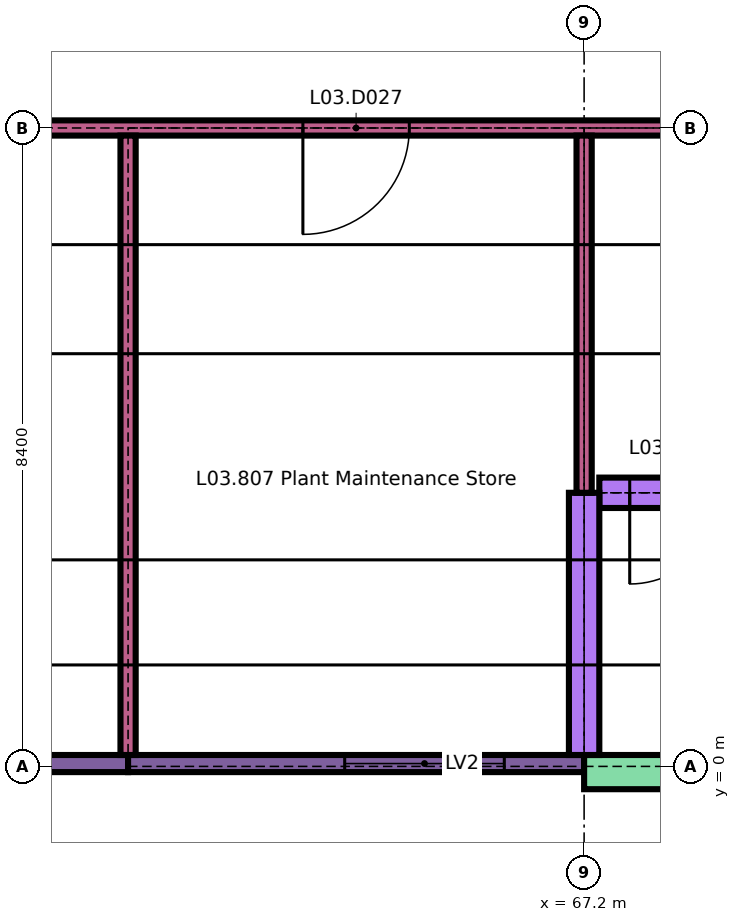
"""IFC4 building model, lengths in metres.
Left out: names, types, materials, properties, quantities, classifications, styles, units other than length and angle.
Written with IfcOpenShell. Run it as: python <this file> out.ifc"""

import sys

from ifc_helpers import new_model, si_unit, direction, frame, frame_2d, origin, place, context, subcontext, project, spatial, rectangle, extrude, element, fill, save


model = new_model("IFC4")
c1 = context("Model", 3, precision=1e-05, world=origin(), true_north=direction((0.0, 1.0)))
c2 = subcontext(c1, "Body", "Model", "MODEL_VIEW")
j1 = project(units=[si_unit("LENGTHUNIT", "METRE"), si_unit("PLANEANGLEUNIT", "RADIAN")], contexts=[c1])
p1 = place(None, origin())
s1 = spatial("IfcSite", under=j1, at=p1, CompositionType="ELEMENT")
p2 = place(p1, origin())
s2 = spatial("IfcBuilding", under=s1, at=p2, CompositionType="ELEMENT")
p3 = place(p2, frame((0.0, 0.0, 15.3)))
s3 = spatial("IfcBuildingStorey", under=s2, at=p3, CompositionType="ELEMENT", Elevation=15.3)
p4 = place(p3, frame((59.175, 0.038, 0.0), z_axis=(0.0, 0.0, 1.0), x_axis=(1.0, 0.0, 0.0)))
e1 = element("IfcWall", 1, at=p4, inside=s3, PredefinedType="SOLIDWALL", context=c2, shape_type="SweptSolid", body=[
    extrude(rectangle(XDim=2.025, YDim=0.225, at=frame_2d((1.012, 0.0))), origin(), (0.0, 0.0, 1.0), 4.0),
])
p5 = place(p3, frame((61.2, 0.038, 0.0), z_axis=(0.0, 0.0, 1.0), x_axis=(1.0, 0.0, 0.0)))
e2 = element("IfcWall", 2, at=p5, inside=s3, PredefinedType="SOLIDWALL", context=c2, shape_type="SweptSolid", body=[
    extrude(rectangle(XDim=6.0, YDim=0.225, at=frame_2d((3.0, 0.0))), origin(), (0.0, 0.0, 1.0), 4.0),
])
p6 = place(p5, frame((2.85, 0.0, 0.6)))
e3 = element("IfcOpeningElement", 3, at=p6, cuts=e2, PredefinedType="OPENING", context=c2, shape_type="SweptSolid", body=[
    extrude(rectangle(XDim=2.1, YDim=2.1, at=frame_2d((1.05, 1.05))), frame((0.0, 0.123, 0.0), z_axis=(0.0, -1.0, 0.0), x_axis=(1.0, 0.0, 0.0)), (0.0, 0.0, 1.0), 0.245),
])
p7 = place(p3, frame((67.2, -0.075, 0.0), z_axis=(0.0, 0.0, 1.0), x_axis=(1.0, 0.0, 0.0)))
e4 = element("IfcWall", 4, at=p7, inside=s3, PredefinedType="SOLIDWALL", context=c2, shape_type="SweptSolid", body=[
    extrude(rectangle(XDim=3.15, YDim=0.45, at=frame_2d((1.575, 0.0))), origin(), (0.0, 0.0, 1.0), 4.0),
])
p8 = place(p3, frame((42.21, 4.2, 4.904), z_axis=(0.0, 0.0, 1.0), x_axis=(1.0, 0.0, 0.0)))
e5 = element("IfcWall", 5, at=p8, inside=s3, PredefinedType="SOLIDWALL", context=c2, shape_type="SweptSolid", body=[
    extrude(rectangle(XDim=58.38, YDim=0.2, at=frame_2d((29.19, 0.0))), origin(), (0.0, 0.0, 1.0), 2.539),
])
p9 = place(p8, frame((1.05, 0.0, 0.3)))
e6 = element("IfcOpeningElement", 6, at=p9, cuts=e5, PredefinedType="OPENING", context=c2, shape_type="SweptSolid", body=[
    extrude(rectangle(XDim=2.1, YDim=1.8, at=frame_2d((1.05, 0.9))), frame((0.0, 0.11, 0.0), z_axis=(0.0, -1.0, 0.0), x_axis=(1.0, 0.0, 0.0)), (0.0, 0.0, 1.0), 0.22),
])
p10 = place(p8, frame((5.25, 0.0, 0.3)))
e7 = element("IfcOpeningElement", 7, at=p10, cuts=e5, PredefinedType="OPENING", context=c2, shape_type="SweptSolid", body=[
    extrude(rectangle(XDim=2.1, YDim=1.8, at=frame_2d((1.05, 0.9))), frame((0.0, 0.11, 0.0), z_axis=(0.0, -1.0, 0.0), x_axis=(1.0, 0.0, 0.0)), (0.0, 0.0, 1.0), 0.22),
])
p11 = place(p8, frame((9.45, 0.0, 0.3)))
e8 = element("IfcOpeningElement", 8, at=p11, cuts=e5, PredefinedType="OPENING", context=c2, shape_type="SweptSolid", body=[
    extrude(rectangle(XDim=2.1, YDim=1.8, at=frame_2d((1.05, 0.9))), frame((0.0, 0.11, 0.0), z_axis=(0.0, -1.0, 0.0), x_axis=(1.0, 0.0, 0.0)), (0.0, 0.0, 1.0), 0.22),
])
p12 = place(p8, frame((13.65, 0.0, 0.3)))
e9 = element("IfcOpeningElement", 9, at=p12, cuts=e5, PredefinedType="OPENING", context=c2, shape_type="SweptSolid", body=[
    extrude(rectangle(XDim=2.1, YDim=1.8, at=frame_2d((1.05, 0.9))), frame((0.0, 0.11, 0.0), z_axis=(0.0, -1.0, 0.0), x_axis=(1.0, 0.0, 0.0)), (0.0, 0.0, 1.0), 0.22),
])
p13 = place(p8, frame((17.85, 0.0, 0.3)))
e10 = element("IfcOpeningElement", 10, at=p13, cuts=e5, PredefinedType="OPENING", context=c2, shape_type="SweptSolid", body=[
    extrude(rectangle(XDim=2.1, YDim=1.8, at=frame_2d((1.05, 0.9))), frame((0.0, 0.11, 0.0), z_axis=(0.0, -1.0, 0.0), x_axis=(1.0, 0.0, 0.0)), (0.0, 0.0, 1.0), 0.22),
])
p14 = place(p8, frame((22.05, 0.0, 0.3)))
e11 = element("IfcOpeningElement", 11, at=p14, cuts=e5, PredefinedType="OPENING", context=c2, shape_type="SweptSolid", body=[
    extrude(rectangle(XDim=2.1, YDim=1.8, at=frame_2d((1.05, 0.9))), frame((0.0, 0.11, 0.0), z_axis=(0.0, -1.0, 0.0), x_axis=(1.0, 0.0, 0.0)), (0.0, 0.0, 1.0), 0.22),
])
p15 = place(p8, frame((26.25, 0.0, 0.3)))
e12 = element("IfcOpeningElement", 12, at=p15, cuts=e5, PredefinedType="OPENING", context=c2, shape_type="SweptSolid", body=[
    extrude(rectangle(XDim=2.1, YDim=1.8, at=frame_2d((1.05, 0.9))), frame((0.0, 0.11, 0.0), z_axis=(0.0, -1.0, 0.0), x_axis=(1.0, 0.0, 0.0)), (0.0, 0.0, 1.0), 0.22),
])
p16 = place(p8, frame((30.45, 0.0, 0.3)))
e13 = element("IfcOpeningElement", 13, at=p16, cuts=e5, PredefinedType="OPENING", context=c2, shape_type="SweptSolid", body=[
    extrude(rectangle(XDim=2.1, YDim=1.8, at=frame_2d((1.05, 0.9))), frame((0.0, 0.11, 0.0), z_axis=(0.0, -1.0, 0.0), x_axis=(1.0, 0.0, 0.0)), (0.0, 0.0, 1.0), 0.22),
])
p17 = place(p8, frame((34.65, 0.0, 0.3)))
e14 = element("IfcOpeningElement", 14, at=p17, cuts=e5, PredefinedType="OPENING", context=c2, shape_type="SweptSolid", body=[
    extrude(rectangle(XDim=2.1, YDim=1.8, at=frame_2d((1.05, 0.9))), frame((0.0, 0.11, 0.0), z_axis=(0.0, -1.0, 0.0), x_axis=(1.0, 0.0, 0.0)), (0.0, 0.0, 1.0), 0.22),
])
p18 = place(p8, frame((38.85, 0.0, 0.3)))
e15 = element("IfcOpeningElement", 15, at=p18, cuts=e5, PredefinedType="OPENING", context=c2, shape_type="SweptSolid", body=[
    extrude(rectangle(XDim=2.1, YDim=1.8, at=frame_2d((1.05, 0.9))), frame((0.0, 0.11, 0.0), z_axis=(0.0, -1.0, 0.0), x_axis=(1.0, 0.0, 0.0)), (0.0, 0.0, 1.0), 0.22),
])
p19 = place(p8, frame((43.05, 0.0, 0.3)))
e16 = element("IfcOpeningElement", 16, at=p19, cuts=e5, PredefinedType="OPENING", context=c2, shape_type="SweptSolid", body=[
    extrude(rectangle(XDim=2.1, YDim=1.8, at=frame_2d((1.05, 0.9))), frame((0.0, 0.11, 0.0), z_axis=(0.0, -1.0, 0.0), x_axis=(1.0, 0.0, 0.0)), (0.0, 0.0, 1.0), 0.22),
])
p20 = place(p8, frame((47.25, 0.0, 0.3)))
e17 = element("IfcOpeningElement", 17, at=p20, cuts=e5, PredefinedType="OPENING", context=c2, shape_type="SweptSolid", body=[
    extrude(rectangle(XDim=2.1, YDim=1.8, at=frame_2d((1.05, 0.9))), frame((0.0, 0.11, 0.0), z_axis=(0.0, -1.0, 0.0), x_axis=(1.0, 0.0, 0.0)), (0.0, 0.0, 1.0), 0.22),
])
p21 = place(p8, frame((51.45, 0.0, 0.3)))
e18 = element("IfcOpeningElement", 18, at=p21, cuts=e5, PredefinedType="OPENING", context=c2, shape_type="SweptSolid", body=[
    extrude(rectangle(XDim=2.1, YDim=1.8, at=frame_2d((1.05, 0.9))), frame((0.0, 0.11, 0.0), z_axis=(0.0, -1.0, 0.0), x_axis=(1.0, 0.0, 0.0)), (0.0, 0.0, 1.0), 0.22),
])
p22 = place(p8, frame((55.65, 0.0, 0.3)))
e19 = element("IfcOpeningElement", 19, at=p22, cuts=e5, PredefinedType="OPENING", context=c2, shape_type="SweptSolid", body=[
    extrude(rectangle(XDim=2.1, YDim=1.8, at=frame_2d((1.05, 0.9))), frame((0.0, 0.11, 0.0), z_axis=(0.0, -1.0, 0.0), x_axis=(1.0, 0.0, 0.0)), (0.0, 0.0, 1.0), 0.22),
])
p23 = place(p3, frame((42.21, 8.4, 4.904), z_axis=(0.0, 0.0, 1.0), x_axis=(1.0, 0.0, 0.0)))
e20 = element("IfcWall", 20, at=p23, inside=s3, PredefinedType="SOLIDWALL", context=c2, shape_type="SweptSolid", body=[
    extrude(rectangle(XDim=58.38, YDim=0.2, at=frame_2d((29.19, 0.0))), origin(), (0.0, 0.0, 1.0), 2.539),
])
p24 = place(p23, frame((1.05, 0.0, 0.3)))
e21 = element("IfcOpeningElement", 21, at=p24, cuts=e20, PredefinedType="OPENING", context=c2, shape_type="SweptSolid", body=[
    extrude(rectangle(XDim=2.1, YDim=1.8, at=frame_2d((1.05, 0.9))), frame((0.0, 0.11, 0.0), z_axis=(0.0, -1.0, 0.0), x_axis=(1.0, 0.0, 0.0)), (0.0, 0.0, 1.0), 0.22),
])
p25 = place(p23, frame((5.25, 0.0, 0.3)))
e22 = element("IfcOpeningElement", 22, at=p25, cuts=e20, PredefinedType="OPENING", context=c2, shape_type="SweptSolid", body=[
    extrude(rectangle(XDim=2.1, YDim=1.8, at=frame_2d((1.05, 0.9))), frame((0.0, 0.11, 0.0), z_axis=(0.0, -1.0, 0.0), x_axis=(1.0, 0.0, 0.0)), (0.0, 0.0, 1.0), 0.22),
])
p26 = place(p23, frame((9.45, 0.0, 0.3)))
e23 = element("IfcOpeningElement", 23, at=p26, cuts=e20, PredefinedType="OPENING", context=c2, shape_type="SweptSolid", body=[
    extrude(rectangle(XDim=2.1, YDim=1.8, at=frame_2d((1.05, 0.9))), frame((0.0, 0.11, 0.0), z_axis=(0.0, -1.0, 0.0), x_axis=(1.0, 0.0, 0.0)), (0.0, 0.0, 1.0), 0.22),
])
p27 = place(p23, frame((13.65, 0.0, 0.3)))
e24 = element("IfcOpeningElement", 24, at=p27, cuts=e20, PredefinedType="OPENING", context=c2, shape_type="SweptSolid", body=[
    extrude(rectangle(XDim=2.1, YDim=1.8, at=frame_2d((1.05, 0.9))), frame((0.0, 0.11, 0.0), z_axis=(0.0, -1.0, 0.0), x_axis=(1.0, 0.0, 0.0)), (0.0, 0.0, 1.0), 0.22),
])
p28 = place(p23, frame((17.85, 0.0, 0.3)))
e25 = element("IfcOpeningElement", 25, at=p28, cuts=e20, PredefinedType="OPENING", context=c2, shape_type="SweptSolid", body=[
    extrude(rectangle(XDim=2.1, YDim=1.8, at=frame_2d((1.05, 0.9))), frame((0.0, 0.11, 0.0), z_axis=(0.0, -1.0, 0.0), x_axis=(1.0, 0.0, 0.0)), (0.0, 0.0, 1.0), 0.22),
])
p29 = place(p23, frame((22.05, 0.0, 0.3)))
e26 = element("IfcOpeningElement", 26, at=p29, cuts=e20, PredefinedType="OPENING", context=c2, shape_type="SweptSolid", body=[
    extrude(rectangle(XDim=2.1, YDim=1.8, at=frame_2d((1.05, 0.9))), frame((0.0, 0.11, 0.0), z_axis=(0.0, -1.0, 0.0), x_axis=(1.0, 0.0, 0.0)), (0.0, 0.0, 1.0), 0.22),
])
p30 = place(p23, frame((26.25, 0.0, 0.3)))
e27 = element("IfcOpeningElement", 27, at=p30, cuts=e20, PredefinedType="OPENING", context=c2, shape_type="SweptSolid", body=[
    extrude(rectangle(XDim=2.1, YDim=1.8, at=frame_2d((1.05, 0.9))), frame((0.0, 0.11, 0.0), z_axis=(0.0, -1.0, 0.0), x_axis=(1.0, 0.0, 0.0)), (0.0, 0.0, 1.0), 0.22),
])
p31 = place(p23, frame((30.45, 0.0, 0.3)))
e28 = element("IfcOpeningElement", 28, at=p31, cuts=e20, PredefinedType="OPENING", context=c2, shape_type="SweptSolid", body=[
    extrude(rectangle(XDim=2.1, YDim=1.8, at=frame_2d((1.05, 0.9))), frame((0.0, 0.11, 0.0), z_axis=(0.0, -1.0, 0.0), x_axis=(1.0, 0.0, 0.0)), (0.0, 0.0, 1.0), 0.22),
])
p32 = place(p23, frame((34.65, 0.0, 0.3)))
e29 = element("IfcOpeningElement", 29, at=p32, cuts=e20, PredefinedType="OPENING", context=c2, shape_type="SweptSolid", body=[
    extrude(rectangle(XDim=2.1, YDim=1.8, at=frame_2d((1.05, 0.9))), frame((0.0, 0.11, 0.0), z_axis=(0.0, -1.0, 0.0), x_axis=(1.0, 0.0, 0.0)), (0.0, 0.0, 1.0), 0.22),
])
p33 = place(p23, frame((38.85, 0.0, 0.3)))
e30 = element("IfcOpeningElement", 30, at=p33, cuts=e20, PredefinedType="OPENING", context=c2, shape_type="SweptSolid", body=[
    extrude(rectangle(XDim=2.1, YDim=1.8, at=frame_2d((1.05, 0.9))), frame((0.0, 0.11, 0.0), z_axis=(0.0, -1.0, 0.0), x_axis=(1.0, 0.0, 0.0)), (0.0, 0.0, 1.0), 0.22),
])
p34 = place(p23, frame((43.05, 0.0, 0.3)))
e31 = element("IfcOpeningElement", 31, at=p34, cuts=e20, PredefinedType="OPENING", context=c2, shape_type="SweptSolid", body=[
    extrude(rectangle(XDim=2.1, YDim=1.8, at=frame_2d((1.05, 0.9))), frame((0.0, 0.11, 0.0), z_axis=(0.0, -1.0, 0.0), x_axis=(1.0, 0.0, 0.0)), (0.0, 0.0, 1.0), 0.22),
])
p35 = place(p23, frame((47.25, 0.0, 0.3)))
e32 = element("IfcOpeningElement", 32, at=p35, cuts=e20, PredefinedType="OPENING", context=c2, shape_type="SweptSolid", body=[
    extrude(rectangle(XDim=2.1, YDim=1.8, at=frame_2d((1.05, 0.9))), frame((0.0, 0.11, 0.0), z_axis=(0.0, -1.0, 0.0), x_axis=(1.0, 0.0, 0.0)), (0.0, 0.0, 1.0), 0.22),
])
p36 = place(p23, frame((51.45, 0.0, 0.3)))
e33 = element("IfcOpeningElement", 33, at=p36, cuts=e20, PredefinedType="OPENING", context=c2, shape_type="SweptSolid", body=[
    extrude(rectangle(XDim=2.1, YDim=1.8, at=frame_2d((1.05, 0.9))), frame((0.0, 0.11, 0.0), z_axis=(0.0, -1.0, 0.0), x_axis=(1.0, 0.0, 0.0)), (0.0, 0.0, 1.0), 0.22),
])
p37 = place(p23, frame((55.65, 0.0, 0.3)))
e34 = element("IfcOpeningElement", 34, at=p37, cuts=e20, PredefinedType="OPENING", context=c2, shape_type="SweptSolid", body=[
    extrude(rectangle(XDim=2.1, YDim=1.8, at=frame_2d((1.05, 0.9))), frame((0.0, 0.11, 0.0), z_axis=(0.0, -1.0, 0.0), x_axis=(1.0, 0.0, 0.0)), (0.0, 0.0, 1.0), 0.22),
])
p38 = place(p3, frame((67.4, 3.6, 0.0), z_axis=(0.0, 0.0, 1.0), x_axis=(1.0, 0.0, 0.0)))
e35 = element("IfcWall", 35, at=p38, inside=s3, PredefinedType="SHEAR", context=c2, shape_type="SweptSolid", body=[
    extrude(rectangle(XDim=8.0, YDim=0.4, at=frame_2d((4.0, 0.0))), origin(), (0.0, 0.0, 1.0), 4.0),
])
p39 = place(p38, frame((0.4, 0.0, 0.0)))
e36 = element("IfcOpeningElement", 36, at=p39, cuts=e35, PredefinedType="OPENING", context=c2, shape_type="SweptSolid", body=[
    extrude(rectangle(XDim=1.2, YDim=2.1, at=frame_2d((0.6, 1.05))), frame((0.0, 0.21, 0.0), z_axis=(0.0, -1.0, 0.0), x_axis=(1.0, 0.0, 0.0)), (0.0, 0.0, 1.0), 0.42),
])
p40 = place(p3, frame((59.175, 8.4, 0.0), z_axis=(0.0, 0.0, 1.0), x_axis=(1.0, 0.0, 0.0)))
e37 = element("IfcWall", 37, at=p40, inside=s3, PredefinedType="PARTITIONING", context=c2, shape_type="SweptSolid", body=[
    extrude(rectangle(XDim=24.45, YDim=0.2, at=frame_2d((12.225, 0.0))), origin(), (0.0, 0.0, 1.0), 4.0),
])
p41 = place(p40, frame((4.325, 0.0, 0.0)))
e38 = element("IfcOpeningElement", 38, at=p41, cuts=e37, PredefinedType="OPENING", context=c2, shape_type="SweptSolid", body=[
    extrude(rectangle(XDim=1.4, YDim=2.1, at=frame_2d((0.7, 1.05))), frame((0.0, 0.11, 0.0), z_axis=(0.0, -1.0, 0.0), x_axis=(1.0, 0.0, 0.0)), (0.0, 0.0, 1.0), 0.22),
])
p42 = place(p40, frame((11.325, 0.0, 0.0)))
e39 = element("IfcOpeningElement", 39, at=p42, cuts=e37, PredefinedType="OPENING", context=c2, shape_type="SweptSolid", body=[
    extrude(rectangle(XDim=1.8, YDim=2.4, at=frame_2d((0.9, 1.2))), frame((0.0, 0.11, 0.0), z_axis=(0.0, -1.0, 0.0), x_axis=(1.0, 0.0, 0.0)), (0.0, 0.0, 1.0), 0.22),
])
p43 = place(p40, frame((19.738, 0.0, 0.0)))
e40 = element("IfcOpeningElement", 40, at=p43, cuts=e37, PredefinedType="OPENING", context=c2, shape_type="SweptSolid", body=[
    extrude(rectangle(XDim=1.4, YDim=2.1, at=frame_2d((0.7, 1.05))), frame((0.0, 0.11, 0.0), z_axis=(0.0, -1.0, 0.0), x_axis=(1.0, 0.0, 0.0)), (0.0, 0.0, 1.0), 0.22),
])
p44 = place(p3, frame((61.2, 0.15, 0.0), z_axis=(0.0, 0.0, 1.0), x_axis=(0.0, 1.0, 0.0)))
e41 = element("IfcWall", 41, at=p44, inside=s3, PredefinedType="PARTITIONING", context=c2, shape_type="SweptSolid", body=[
    extrude(rectangle(XDim=8.15, YDim=0.2, at=frame_2d((4.075, 0.0))), origin(), (0.0, 0.0, 1.0), 4.0),
])
p45 = place(p3, frame((67.2, 0.15, 0.0), z_axis=(0.0, 0.0, 1.0), x_axis=(0.0, 1.0, 0.0)))
e42 = element("IfcWall", 42, at=p45, inside=s3, PredefinedType="SHEAR", context=c2, shape_type="SweptSolid", body=[
    extrude(rectangle(XDim=3.45, YDim=0.4, at=frame_2d((1.725, 0.0))), origin(), (0.0, 0.0, 1.0), 4.0),
])
p46 = place(p3, frame((67.2, 3.6, 0.0), z_axis=(0.0, 0.0, 1.0), x_axis=(0.0, 1.0, 0.0)))
e43 = element("IfcWall", 43, at=p46, inside=s3, PredefinedType="PARTITIONING", context=c2, shape_type="SweptSolid", body=[
    extrude(rectangle(XDim=4.7, YDim=0.2, at=frame_2d((2.35, 0.0))), origin(), (0.0, 0.0, 1.0), 4.0),
])
p47 = place(p6, origin())
e44 = element("IfcWindow", 44, at=p47, inside=s3, PartitioningType="SINGLE_PANEL", PredefinedType="WINDOW", context=c2, shape_type="SweptSolid", body=[
    extrude(rectangle(XDim=2.1, YDim=2.1, at=frame_2d((1.05, 1.05))), frame((0.0, 0.075, 0.0), z_axis=(0.0, -1.0, 0.0), x_axis=(1.0, 0.0, 0.0)), (0.0, 0.0, 1.0), 0.15),
])
fill(e3, e44)
p48 = place(p13, origin())
e45 = element("IfcWindow", 45, at=p48, inside=s3, PartitioningType="SINGLE_PANEL", PredefinedType="WINDOW", context=c2, shape_type="SweptSolid", body=[
    extrude(rectangle(XDim=2.1, YDim=1.8, at=frame_2d((1.05, 0.9))), frame((0.0, 0.075, 0.0), z_axis=(0.0, -1.0, 0.0), x_axis=(1.0, 0.0, 0.0)), (0.0, 0.0, 1.0), 0.15),
])
fill(e10, e45)
p49 = place(p14, origin())
e46 = element("IfcWindow", 46, at=p49, inside=s3, PartitioningType="SINGLE_PANEL", PredefinedType="WINDOW", context=c2, shape_type="SweptSolid", body=[
    extrude(rectangle(XDim=2.1, YDim=1.8, at=frame_2d((1.05, 0.9))), frame((0.0, 0.075, 0.0), z_axis=(0.0, -1.0, 0.0), x_axis=(1.0, 0.0, 0.0)), (0.0, 0.0, 1.0), 0.15),
])
fill(e11, e46)
p50 = place(p28, origin())
e47 = element("IfcWindow", 47, at=p50, inside=s3, PartitioningType="SINGLE_PANEL", PredefinedType="WINDOW", context=c2, shape_type="SweptSolid", body=[
    extrude(rectangle(XDim=2.1, YDim=1.8, at=frame_2d((1.05, 0.9))), frame((0.0, 0.075, 0.0), z_axis=(0.0, -1.0, 0.0), x_axis=(1.0, 0.0, 0.0)), (0.0, 0.0, 1.0), 0.15),
])
fill(e25, e47)
p51 = place(p29, origin())
e48 = element("IfcWindow", 48, at=p51, inside=s3, PartitioningType="SINGLE_PANEL", PredefinedType="WINDOW", context=c2, shape_type="SweptSolid", body=[
    extrude(rectangle(XDim=2.1, YDim=1.8, at=frame_2d((1.05, 0.9))), frame((0.0, 0.075, 0.0), z_axis=(0.0, -1.0, 0.0), x_axis=(1.0, 0.0, 0.0)), (0.0, 0.0, 1.0), 0.15),
])
fill(e26, e48)
p52 = place(p39, origin())
e49 = element("IfcDoor", 49, at=p52, inside=s3, OperationType="SINGLE_SWING_LEFT", PredefinedType="DOOR", context=c2, shape_type="SweptSolid", body=[
    extrude(rectangle(XDim=1.2, YDim=2.1, at=frame_2d((0.6, 1.05))), frame((0.0, 0.025, 0.0), z_axis=(0.0, -1.0, 0.0), x_axis=(1.0, 0.0, 0.0)), (0.0, 0.0, 1.0), 0.05),
])
fill(e36, e49)
p53 = place(p41, origin())
e50 = element("IfcDoor", 50, at=p53, inside=s3, OperationType="SINGLE_SWING_LEFT", PredefinedType="DOOR", context=c2, shape_type="SweptSolid", body=[
    extrude(rectangle(XDim=1.4, YDim=2.1, at=frame_2d((0.7, 1.05))), frame((0.0, 0.025, 0.0), z_axis=(0.0, -1.0, 0.0), x_axis=(1.0, 0.0, 0.0)), (0.0, 0.0, 1.0), 0.05),
])
fill(e38, e50)
save(model, sys.argv[1])
